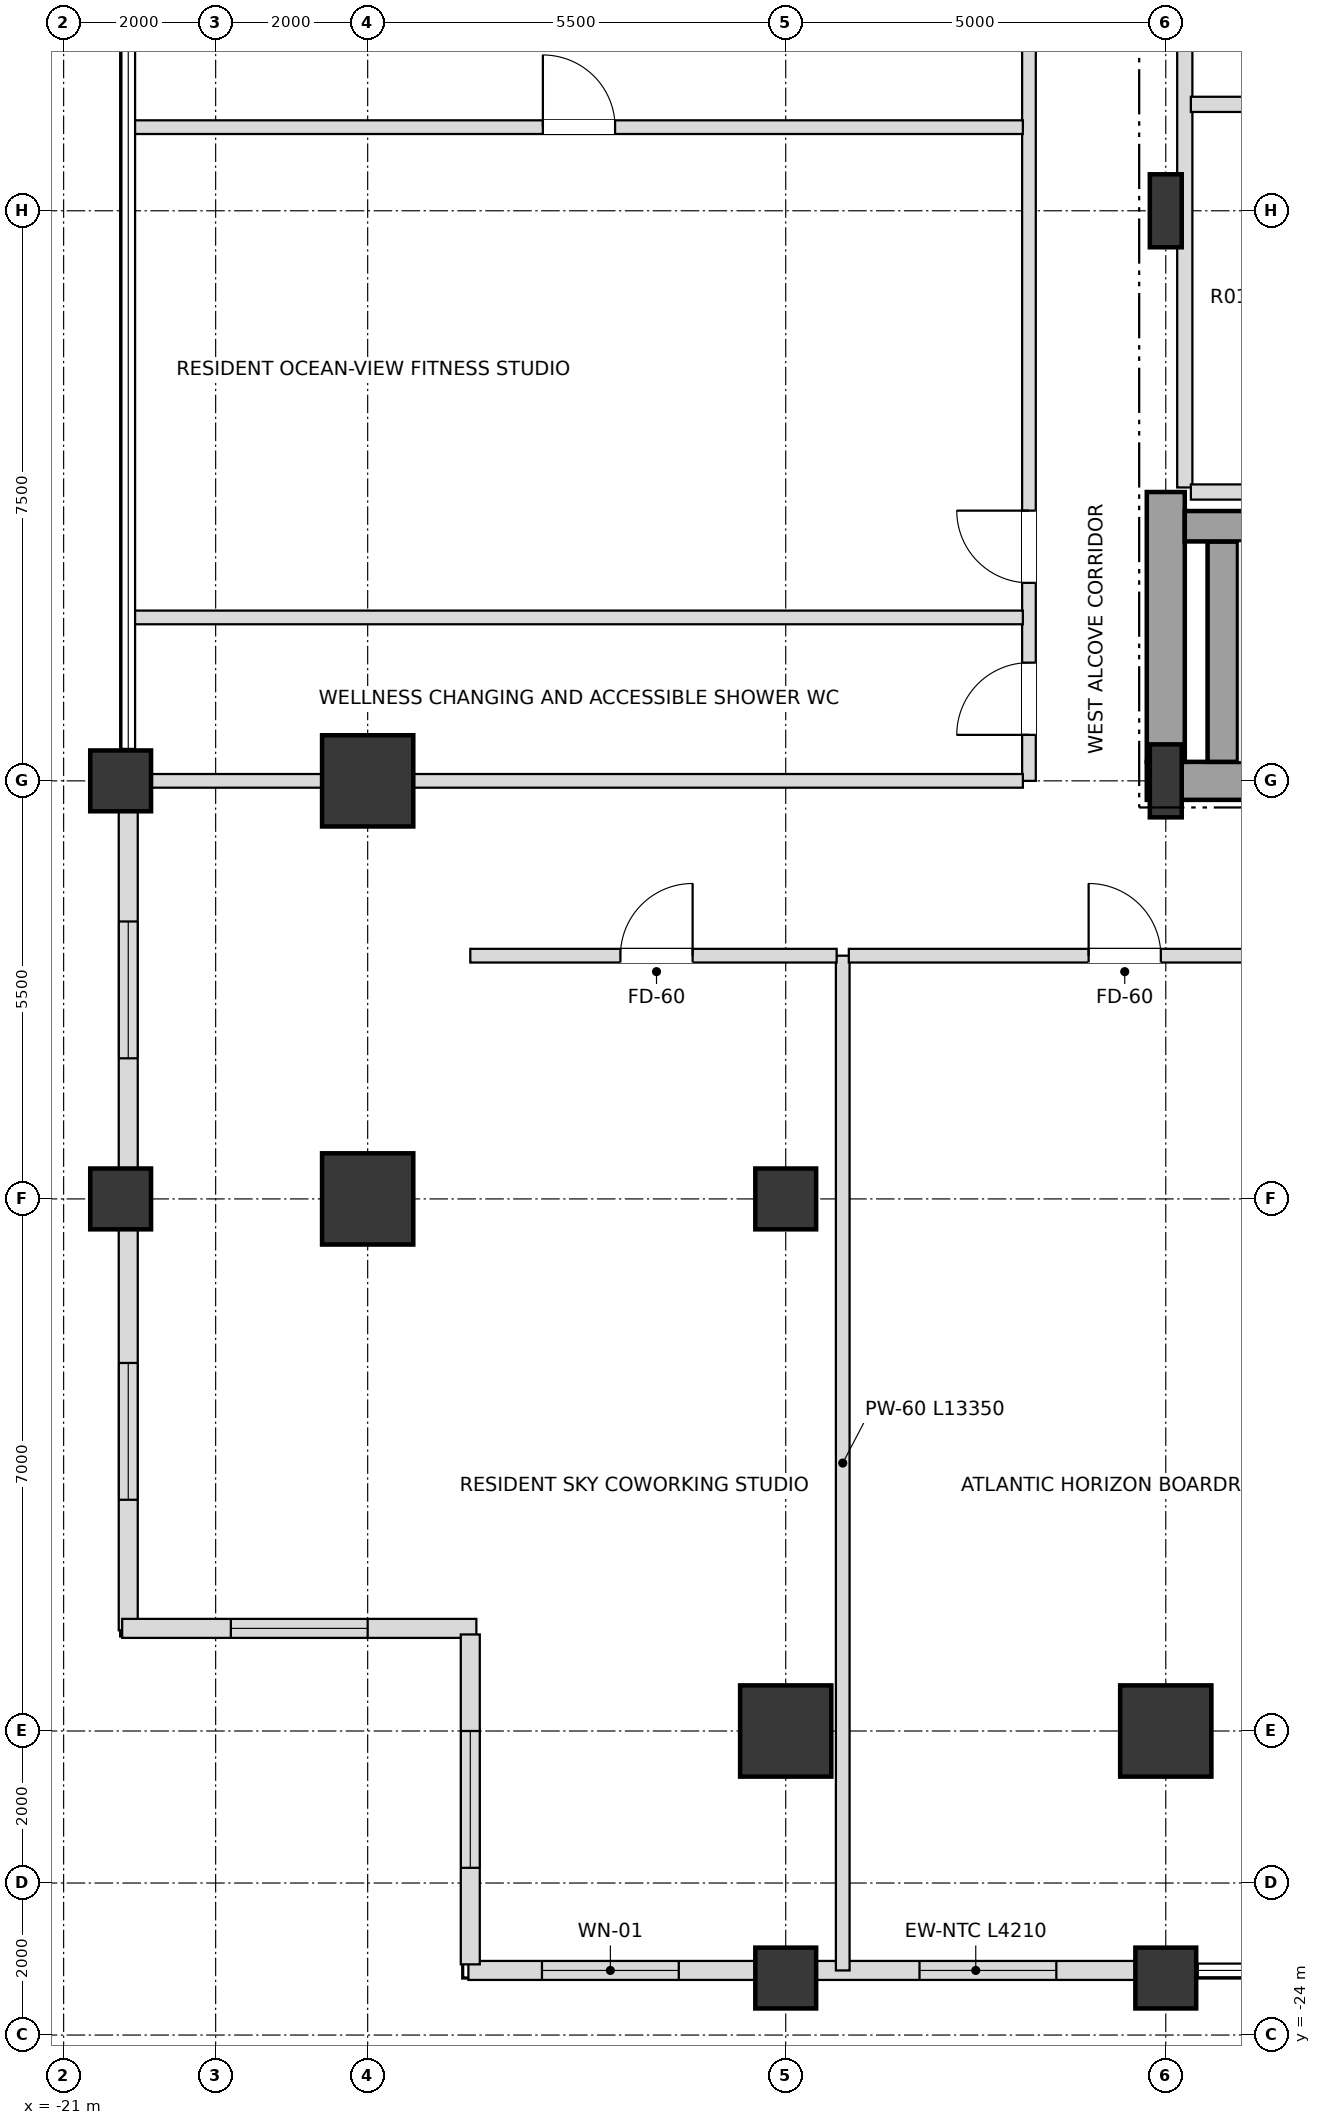
"""IFC4 building model, lengths in metres.
Left out: names, types, materials, properties, quantities, classifications, styles, units other than length and angle.
Written with IfcOpenShell. Run it as: python <this file> out.ifc"""

import sys

from ifc_helpers import new_model, si_unit, direction, frame, frame_2d, origin, origin_2d, place, context, subcontext, project, spatial, rectangle, i_section, extrude, element, fill, save


model = new_model("IFC4")
c1 = context("Model", 3, precision=1e-05, world=origin(), true_north=direction((0.0, 1.0)))
c2 = subcontext(c1, "Body", "Model", "MODEL_VIEW")
j1 = project(units=[si_unit("LENGTHUNIT", "METRE"), si_unit("PLANEANGLEUNIT", "RADIAN")], contexts=[c1])
p1 = place(None, origin())
s1 = spatial("IfcSite", under=j1, at=p1, CompositionType="ELEMENT")
p2 = place(p1, origin())
s2 = spatial("IfcBuilding", under=s1, at=p2, CompositionType="ELEMENT")
p3 = place(p2, frame((0.0, 0.0, 158.4)))
s3 = spatial("IfcBuildingStorey", under=s2, at=p3, CompositionType="ELEMENT", Elevation=158.4)
for number, where, z_axis, x_axis in (
    (1, (-6.5, -7.5, 0.0), (0.0, 0.0, 1.0), (1.0, 0.0, 0.0)),
    (2, (-6.5, 0.0, 0.0), (0.0, 0.0, 1.0), (1.0, 0.0, 0.0)),
):
    element("IfcColumn", number, at=place(p3, frame(where, z_axis=z_axis, x_axis=x_axis)), inside=s3, PredefinedType="COLUMN", context=c2, shape_type="SweptSolid", body=[
        extrude(i_section(OverallWidth=0.42, OverallDepth=0.96, WebThickness=0.022, FlangeThickness=0.034, at=origin_2d()), origin(), (0.0, 0.0, 1.0), 3.6),
    ])
for number, where, z_axis, x_axis in (
    (3, (-11.5, -20.0, 0.0), (0.0, 0.0, 1.0), (1.0, 0.0, 0.0)),
    (4, (-6.5, -20.0, 0.0), (0.0, 0.0, 1.0), (1.0, 0.0, 0.0)),
    (5, (-17.0, -7.5, 0.0), (0.0, 0.0, 1.0), (1.0, 0.0, 0.0)),
    (6, (-17.0, -13.0, 0.0), (0.0, 0.0, 1.0), (1.0, 0.0, 0.0)),
):
    element("IfcColumn", number, at=place(p3, frame(where, z_axis=z_axis, x_axis=x_axis)), inside=s3, PredefinedType="USERDEFINED", context=c2, shape_type="SweptSolid", body=[
        extrude(rectangle(XDim=1.2, YDim=1.2, at=origin_2d()), origin(), (0.0, 0.0, 1.0), 3.6),
    ])
for number, where, z_axis, x_axis in (
    (7, (-11.5, -13.0, 0.0), (0.0, 0.0, 1.0), (1.0, 0.0, 0.0)),
    (8, (-11.5, -23.25, 0.0), (0.0, 0.0, 1.0), (1.0, 0.0, 0.0)),
    (9, (-6.5, -23.25, 0.0), (0.0, 0.0, 1.0), (1.0, 0.0, 0.0)),
    (10, (-20.25, -13.0, 0.0), (0.0, 0.0, 1.0), (1.0, 0.0, 0.0)),
    (11, (-20.25, -7.5, 0.0), (0.0, 0.0, 1.0), (1.0, 0.0, 0.0)),
):
    element("IfcColumn", number, at=place(p3, frame(where, z_axis=z_axis, x_axis=x_axis)), inside=s3, PredefinedType="COLUMN", context=c2, shape_type="SweptSolid", body=[
        extrude(rectangle(XDim=0.8, YDim=0.8, at=origin_2d()), origin(), (0.0, 0.0, 1.0), 3.6),
    ])
p4 = place(p3, frame((-15.675, -23.15, 0.0), z_axis=(0.0, 0.0, 1.0), x_axis=(1.0, 0.0, 0.0)))
e12 = element("IfcWall", 12, at=p4, inside=s3, PredefinedType="SOLIDWALL", context=c2, shape_type="SweptSolid", body=[
    extrude(rectangle(XDim=3.78, YDim=0.25, at=frame_2d((1.89, 0.0))), origin(), (0.0, 0.0, 1.0), 2.736),
])
p5 = place(p4, frame((0.968, 0.0, 0.72)))
e13 = element("IfcOpeningElement", 13, at=p5, cuts=e12, PredefinedType="OPENING", context=c2, shape_type="SweptSolid", body=[
    extrude(rectangle(XDim=1.8, YDim=1.68, at=frame_2d((0.9, 0.84))), frame((0.0, 0.135, 0.0), z_axis=(0.0, -1.0, 0.0), x_axis=(1.0, 0.0, 0.0)), (0.0, 0.0, 1.0), 0.27),
])
p6 = place(p3, frame((-11.105, -23.15, 0.0), z_axis=(0.0, 0.0, 1.0), x_axis=(1.0, 0.0, 0.0)))
e14 = element("IfcWall", 14, at=p6, inside=s3, PredefinedType="SOLIDWALL", context=c2, shape_type="SweptSolid", body=[
    extrude(rectangle(XDim=4.21, YDim=0.25, at=frame_2d((2.105, 0.0))), origin(), (0.0, 0.0, 1.0), 2.736),
])
p7 = place(p6, frame((1.365, 0.0, 0.72)))
e15 = element("IfcOpeningElement", 15, at=p7, cuts=e14, PredefinedType="OPENING", context=c2, shape_type="SweptSolid", body=[
    extrude(rectangle(XDim=1.8, YDim=1.68, at=frame_2d((0.9, 0.84))), frame((0.0, 0.135, 0.0), z_axis=(0.0, -1.0, 0.0), x_axis=(1.0, 0.0, 0.0)), (0.0, 0.0, 1.0), 0.27),
])
p8 = place(p3, frame((-20.15, -7.895, 0.0), z_axis=(0.0, 0.0, 1.0), x_axis=(0.0, -1.0, 0.0)))
e16 = element("IfcWall", 16, at=p8, inside=s3, PredefinedType="SOLIDWALL", context=c2, shape_type="SweptSolid", body=[
    extrude(rectangle(XDim=4.71, YDim=0.25, at=frame_2d((2.355, 0.0))), origin(), (0.0, 0.0, 1.0), 2.736),
])
p9 = place(p8, frame((1.455, 0.0, 0.72)))
e17 = element("IfcOpeningElement", 17, at=p9, cuts=e16, PredefinedType="OPENING", context=c2, shape_type="SweptSolid", body=[
    extrude(rectangle(XDim=1.8, YDim=1.68, at=frame_2d((0.9, 0.84))), frame((0.0, 0.135, 0.0), z_axis=(0.0, -1.0, 0.0), x_axis=(1.0, 0.0, 0.0)), (0.0, 0.0, 1.0), 0.27),
])
p10 = place(p3, frame((-20.15, -13.395, 0.0), z_axis=(0.0, 0.0, 1.0), x_axis=(0.0, -1.0, 0.0)))
e18 = element("IfcWall", 18, at=p10, inside=s3, PredefinedType="SOLIDWALL", context=c2, shape_type="SweptSolid", body=[
    extrude(rectangle(XDim=5.28, YDim=0.25, at=frame_2d((2.64, 0.0))), origin(), (0.0, 0.0, 1.0), 2.736),
])
p11 = place(p10, frame((1.763, 0.0, 0.72)))
e19 = element("IfcOpeningElement", 19, at=p11, cuts=e18, PredefinedType="OPENING", context=c2, shape_type="SweptSolid", body=[
    extrude(rectangle(XDim=1.8, YDim=1.68, at=frame_2d((0.9, 0.84))), frame((0.0, 0.135, 0.0), z_axis=(0.0, -1.0, 0.0), x_axis=(1.0, 0.0, 0.0)), (0.0, 0.0, 1.0), 0.27),
])
p12 = place(p3, frame((-20.23, -18.65, 0.0), z_axis=(0.0, 0.0, 1.0), x_axis=(1.0, 0.0, 0.0)))
e20 = element("IfcWall", 20, at=p12, inside=s3, PredefinedType="SOLIDWALL", context=c2, shape_type="SweptSolid", body=[
    extrude(rectangle(XDim=4.66, YDim=0.25, at=frame_2d((2.33, 0.0))), origin(), (0.0, 0.0, 1.0), 2.736),
])
p13 = place(p12, frame((1.43, 0.0, 0.72)))
e21 = element("IfcOpeningElement", 21, at=p13, cuts=e20, PredefinedType="OPENING", context=c2, shape_type="SweptSolid", body=[
    extrude(rectangle(XDim=1.8, YDim=1.68, at=frame_2d((0.9, 0.84))), frame((0.0, 0.135, 0.0), z_axis=(0.0, -1.0, 0.0), x_axis=(1.0, 0.0, 0.0)), (0.0, 0.0, 1.0), 0.27),
])
p14 = place(p3, frame((-15.65, -18.73, 0.0), z_axis=(0.0, 0.0, 1.0), x_axis=(0.0, -1.0, 0.0)))
e22 = element("IfcWall", 22, at=p14, inside=s3, PredefinedType="SOLIDWALL", context=c2, shape_type="SweptSolid", body=[
    extrude(rectangle(XDim=4.34, YDim=0.25, at=frame_2d((2.17, 0.0))), origin(), (0.0, 0.0, 1.0), 2.736),
])
p15 = place(p14, frame((1.27, 0.0, 0.72)))
e23 = element("IfcOpeningElement", 23, at=p15, cuts=e22, PredefinedType="OPENING", context=c2, shape_type="SweptSolid", body=[
    extrude(rectangle(XDim=1.8, YDim=1.68, at=frame_2d((0.9, 0.84))), frame((0.0, 0.135, 0.0), z_axis=(0.0, -1.0, 0.0), x_axis=(1.0, 0.0, 0.0)), (0.0, 0.0, 1.0), 0.27),
])
p16 = place(p3, frame((-6.75, -7.5, 0.0), z_axis=(0.0, 0.0, 1.0), x_axis=(1.0, 0.0, 0.0)))
e24 = element("IfcWall", 24, at=p16, inside=s3, PredefinedType="SHEAR", context=c2, shape_type="SweptSolid", body=[
    extrude(rectangle(XDim=6.75, YDim=0.5, at=frame_2d((3.375, 0.0))), origin(), (0.0, 0.0, 1.0), 3.38),
])
p17 = place(p3, frame((-6.5, -7.25, 0.0), z_axis=(0.0, 0.0, 1.0), x_axis=(0.0, 1.0, 0.0)))
e25 = element("IfcWall", 25, at=p17, inside=s3, PredefinedType="SHEAR", context=c2, shape_type="SweptSolid", body=[
    extrude(rectangle(XDim=3.55, YDim=0.5, at=frame_2d((1.775, 0.0))), origin(), (0.0, 0.0, 1.0), 3.38),
])
p18 = place(p3, frame((-5.75, -7.25, 0.0), z_axis=(0.0, 0.0, 1.0), x_axis=(0.0, 1.0, 0.0)))
e26 = element("IfcWall", 26, at=p18, inside=s3, PredefinedType="SHEAR", context=c2, shape_type="SweptSolid", body=[
    extrude(rectangle(XDim=2.9, YDim=0.4, at=frame_2d((1.45, 0.0))), origin(), (0.0, 0.0, 1.0), 3.38),
])
p19 = place(p3, frame((-6.25, -4.15, 0.0), z_axis=(0.0, 0.0, 1.0), x_axis=(1.0, 0.0, 0.0)))
e27 = element("IfcWall", 27, at=p19, inside=s3, PredefinedType="SHEAR", context=c2, shape_type="SweptSolid", body=[
    extrude(rectangle(XDim=7.78, YDim=0.4, at=frame_2d((3.89, 0.0))), origin(), (0.0, 0.0, 1.0), 3.38),
])
p20 = place(p3, frame((-10.75, -23.15, 0.0), z_axis=(0.0, 0.0, 1.0), x_axis=(0.0, 1.0, 0.0)))
e28 = element("IfcWall", 28, at=p20, inside=s3, PredefinedType="PARTITIONING", context=c2, shape_type="SweptSolid", body=[
    extrude(rectangle(XDim=13.35, YDim=0.18, at=frame_2d((6.675, 0.0))), origin(), (0.0, 0.0, 1.0), 2.816),
])
p21 = place(p3, frame((-8.3, -7.5, 0.0), z_axis=(0.0, 0.0, 1.0), x_axis=(0.0, 1.0, 0.0)))
e29 = element("IfcWall", 29, at=p21, inside=s3, PredefinedType="PARTITIONING", context=c2, shape_type="SweptSolid", body=[
    extrude(rectangle(XDim=15.0, YDim=0.18, at=frame_2d((7.5, 0.0))), origin(), (0.0, 0.0, 1.0), 3.38),
])
p22 = place(p21, frame((0.605, 0.0, 0.0)))
e30 = element("IfcOpeningElement", 30, at=p22, cuts=e29, PredefinedType="OPENING", context=c2, shape_type="SweptSolid", body=[
    extrude(rectangle(XDim=0.95, YDim=2.15, at=frame_2d((0.475, 1.075))), frame((0.0, 0.1, 0.0), z_axis=(0.0, -1.0, 0.0), x_axis=(1.0, 0.0, 0.0)), (0.0, 0.0, 1.0), 0.2),
])
p23 = place(p21, frame((2.605, 0.0, 0.0)))
e31 = element("IfcOpeningElement", 31, at=p23, cuts=e29, PredefinedType="OPENING", context=c2, shape_type="SweptSolid", body=[
    extrude(rectangle(XDim=0.95, YDim=2.15, at=frame_2d((0.475, 1.075))), frame((0.0, 0.1, 0.0), z_axis=(0.0, -1.0, 0.0), x_axis=(1.0, 0.0, 0.0)), (0.0, 0.0, 1.0), 0.2),
])
p24 = place(p3, frame((-6.25, -3.64, 0.0), z_axis=(0.0, 0.0, 1.0), x_axis=(0.0, 1.0, 0.0)))
e32 = element("IfcWall", 32, at=p24, inside=s3, PredefinedType="SOLIDWALL", context=c2, shape_type="SweptSolid", body=[
    extrude(rectangle(XDim=7.34, YDim=0.2, at=frame_2d((3.67, 0.0))), origin(), (0.0, 0.0, 1.0), 3.38),
])
p25 = place(p3, frame((-15.65, -9.8, 0.0), z_axis=(0.0, 0.0, 1.0), x_axis=(1.0, 0.0, 0.0)))
e33 = element("IfcWall", 33, at=p25, inside=s3, PredefinedType="PARTITIONING", context=c2, shape_type="SweptSolid", body=[
    extrude(rectangle(XDim=4.82, YDim=0.18, at=frame_2d((2.41, 0.0))), origin(), (0.0, 0.0, 1.0), 3.38),
])
p26 = place(p25, frame((1.975, 0.0, 0.0)))
e34 = element("IfcOpeningElement", 34, at=p26, cuts=e33, PredefinedType="OPENING", context=c2, shape_type="SweptSolid", body=[
    extrude(rectangle(XDim=0.95, YDim=2.15, at=frame_2d((0.475, 1.075))), frame((0.0, 0.1, 0.0), z_axis=(0.0, -1.0, 0.0), x_axis=(1.0, 0.0, 0.0)), (0.0, 0.0, 1.0), 0.2),
])
p27 = place(p3, frame((-10.67, -9.8, 0.0), z_axis=(0.0, 0.0, 1.0), x_axis=(1.0, 0.0, 0.0)))
e35 = element("IfcWall", 35, at=p27, inside=s3, PredefinedType="PARTITIONING", context=c2, shape_type="SweptSolid", body=[
    extrude(rectangle(XDim=7.24, YDim=0.18, at=frame_2d((3.62, 0.0))), origin(), (0.0, 0.0, 1.0), 2.816),
])
p28 = place(p27, frame((3.155, 0.0, 0.0)))
e36 = element("IfcOpeningElement", 36, at=p28, cuts=e35, PredefinedType="OPENING", context=c2, shape_type="SweptSolid", body=[
    extrude(rectangle(XDim=0.95, YDim=2.15, at=frame_2d((0.475, 1.075))), frame((0.0, 0.1, 0.0), z_axis=(0.0, -1.0, 0.0), x_axis=(1.0, 0.0, 0.0)), (0.0, 0.0, 1.0), 0.2),
])
p29 = place(p3, frame((-20.15, -7.5, 0.0), z_axis=(0.0, 0.0, 1.0), x_axis=(1.0, 0.0, 0.0)))
e37 = element("IfcWall", 37, at=p29, inside=s3, PredefinedType="PARTITIONING", context=c2, shape_type="SweptSolid", body=[
    extrude(rectangle(XDim=11.77, YDim=0.18, at=frame_2d((5.885, 0.0))), origin(), (0.0, 0.0, 1.0), 2.816),
])
p30 = place(p3, frame((-20.07, -5.35, 0.0), z_axis=(0.0, 0.0, 1.0), x_axis=(1.0, 0.0, 0.0)))
e38 = element("IfcWall", 38, at=p30, inside=s3, PredefinedType="PARTITIONING", context=c2, shape_type="SweptSolid", body=[
    extrude(rectangle(XDim=11.69, YDim=0.18, at=frame_2d((5.845, 0.0))), origin(), (0.0, 0.0, 1.0), 2.816),
])
p31 = place(p3, frame((-6.17, -3.7, 0.0), z_axis=(0.0, 0.0, 1.0), x_axis=(1.0, 0.0, 0.0)))
e39 = element("IfcWall", 39, at=p31, inside=s3, PredefinedType="SOLIDWALL", context=c2, shape_type="SweptSolid", body=[
    extrude(rectangle(XDim=1.94, YDim=0.2, at=frame_2d((0.97, 0.0))), origin(), (0.0, 0.0, 1.0), 3.38),
])
p32 = place(p3, frame((-20.07, 1.1, 0.0), z_axis=(0.0, 0.0, 1.0), x_axis=(1.0, 0.0, 0.0)))
e40 = element("IfcWall", 40, at=p32, inside=s3, PredefinedType="PARTITIONING", context=c2, shape_type="SweptSolid", body=[
    extrude(rectangle(XDim=11.69, YDim=0.18, at=frame_2d((5.845, 0.0))), origin(), (0.0, 0.0, 1.0), 2.816),
])
p33 = place(p32, frame((5.375, 0.0, 0.0)))
e41 = element("IfcOpeningElement", 41, at=p33, cuts=e40, PredefinedType="OPENING", context=c2, shape_type="SweptSolid", body=[
    extrude(rectangle(XDim=0.95, YDim=2.15, at=frame_2d((0.475, 1.075))), frame((0.0, 0.1, 0.0), z_axis=(0.0, -1.0, 0.0), x_axis=(1.0, 0.0, 0.0)), (0.0, 0.0, 1.0), 0.2),
])
p34 = place(p3, frame((-6.17, 1.4, 0.0), z_axis=(0.0, 0.0, 1.0), x_axis=(1.0, 0.0, 0.0)))
e42 = element("IfcWall", 42, at=p34, inside=s3, PredefinedType="SOLIDWALL", context=c2, shape_type="SweptSolid", body=[
    extrude(rectangle(XDim=1.94, YDim=0.2, at=frame_2d((0.97, 0.0))), origin(), (0.0, 0.0, 1.0), 3.38),
])
p35 = place(p5, origin())
e43 = element("IfcWindow", 43, at=p35, inside=s3, PartitioningType="SINGLE_PANEL", PredefinedType="WINDOW", context=c2, shape_type="SweptSolid", body=[
    extrude(rectangle(XDim=1.8, YDim=1.68, at=frame_2d((0.9, 0.84))), frame((0.0, 0.03, 0.0), z_axis=(0.0, -1.0, 0.0), x_axis=(1.0, 0.0, 0.0)), (0.0, 0.0, 1.0), 0.06),
])
fill(e13, e43)
p36 = place(p7, origin())
e44 = element("IfcWindow", 44, at=p36, inside=s3, PartitioningType="SINGLE_PANEL", PredefinedType="WINDOW", context=c2, shape_type="SweptSolid", body=[
    extrude(rectangle(XDim=1.8, YDim=1.68, at=frame_2d((0.9, 0.84))), frame((0.0, 0.03, 0.0), z_axis=(0.0, -1.0, 0.0), x_axis=(1.0, 0.0, 0.0)), (0.0, 0.0, 1.0), 0.06),
])
fill(e15, e44)
p37 = place(p9, origin())
e45 = element("IfcWindow", 45, at=p37, inside=s3, PartitioningType="SINGLE_PANEL", PredefinedType="WINDOW", context=c2, shape_type="SweptSolid", body=[
    extrude(rectangle(XDim=1.8, YDim=1.68, at=frame_2d((0.9, 0.84))), frame((0.0, 0.03, 0.0), z_axis=(0.0, -1.0, 0.0), x_axis=(1.0, 0.0, 0.0)), (0.0, 0.0, 1.0), 0.06),
])
fill(e17, e45)
p38 = place(p11, origin())
e46 = element("IfcWindow", 46, at=p38, inside=s3, PartitioningType="SINGLE_PANEL", PredefinedType="WINDOW", context=c2, shape_type="SweptSolid", body=[
    extrude(rectangle(XDim=1.8, YDim=1.68, at=frame_2d((0.9, 0.84))), frame((0.0, 0.03, 0.0), z_axis=(0.0, -1.0, 0.0), x_axis=(1.0, 0.0, 0.0)), (0.0, 0.0, 1.0), 0.06),
])
fill(e19, e46)
p39 = place(p13, origin())
e47 = element("IfcWindow", 47, at=p39, inside=s3, PartitioningType="SINGLE_PANEL", PredefinedType="WINDOW", context=c2, shape_type="SweptSolid", body=[
    extrude(rectangle(XDim=1.8, YDim=1.68, at=frame_2d((0.9, 0.84))), frame((0.0, 0.03, 0.0), z_axis=(0.0, -1.0, 0.0), x_axis=(1.0, 0.0, 0.0)), (0.0, 0.0, 1.0), 0.06),
])
fill(e21, e47)
p40 = place(p15, origin())
e48 = element("IfcWindow", 48, at=p40, inside=s3, PartitioningType="SINGLE_PANEL", PredefinedType="WINDOW", context=c2, shape_type="SweptSolid", body=[
    extrude(rectangle(XDim=1.8, YDim=1.68, at=frame_2d((0.9, 0.84))), frame((0.0, 0.03, 0.0), z_axis=(0.0, -1.0, 0.0), x_axis=(1.0, 0.0, 0.0)), (0.0, 0.0, 1.0), 0.06),
])
fill(e23, e48)
p41 = place(p26, origin())
e49 = element("IfcDoor", 49, at=p41, inside=s3, OperationType="SINGLE_SWING_RIGHT", PredefinedType="DOOR", context=c2, shape_type="SweptSolid", body=[
    extrude(rectangle(XDim=0.95, YDim=2.15, at=frame_2d((0.475, 1.075))), frame((0.0, 0.025, 0.0), z_axis=(0.0, -1.0, 0.0), x_axis=(1.0, 0.0, 0.0)), (0.0, 0.0, 1.0), 0.05),
])
fill(e34, e49)
p42 = place(p28, origin())
e50 = element("IfcDoor", 50, at=p42, inside=s3, OperationType="SINGLE_SWING_LEFT", PredefinedType="DOOR", context=c2, shape_type="SweptSolid", body=[
    extrude(rectangle(XDim=0.95, YDim=2.15, at=frame_2d((0.475, 1.075))), frame((0.0, 0.025, 0.0), z_axis=(0.0, -1.0, 0.0), x_axis=(1.0, 0.0, 0.0)), (0.0, 0.0, 1.0), 0.05),
])
fill(e36, e50)
p43 = place(p22, origin())
e51 = element("IfcDoor", 51, at=p43, inside=s3, OperationType="SINGLE_SWING_LEFT", PredefinedType="DOOR", context=c2, shape_type="SweptSolid", body=[
    extrude(rectangle(XDim=0.95, YDim=2.15, at=frame_2d((0.475, 1.075))), frame((0.0, 0.025, 0.0), z_axis=(0.0, -1.0, 0.0), x_axis=(1.0, 0.0, 0.0)), (0.0, 0.0, 1.0), 0.05),
])
fill(e30, e51)
p44 = place(p23, origin())
e52 = element("IfcDoor", 52, at=p44, inside=s3, OperationType="SINGLE_SWING_RIGHT", PredefinedType="DOOR", context=c2, shape_type="SweptSolid", body=[
    extrude(rectangle(XDim=0.95, YDim=2.15, at=frame_2d((0.475, 1.075))), frame((0.0, 0.025, 0.0), z_axis=(0.0, -1.0, 0.0), x_axis=(1.0, 0.0, 0.0)), (0.0, 0.0, 1.0), 0.05),
])
fill(e31, e52)
p45 = place(p33, origin())
e53 = element("IfcDoor", 53, at=p45, inside=s3, OperationType="SINGLE_SWING_LEFT", PredefinedType="DOOR", context=c2, shape_type="SweptSolid", body=[
    extrude(rectangle(XDim=0.95, YDim=2.15, at=frame_2d((0.475, 1.075))), frame((0.0, 0.025, 0.0), z_axis=(0.0, -1.0, 0.0), x_axis=(1.0, 0.0, 0.0)), (0.0, 0.0, 1.0), 0.05),
])
fill(e41, e53)
save(model, sys.argv[1])
